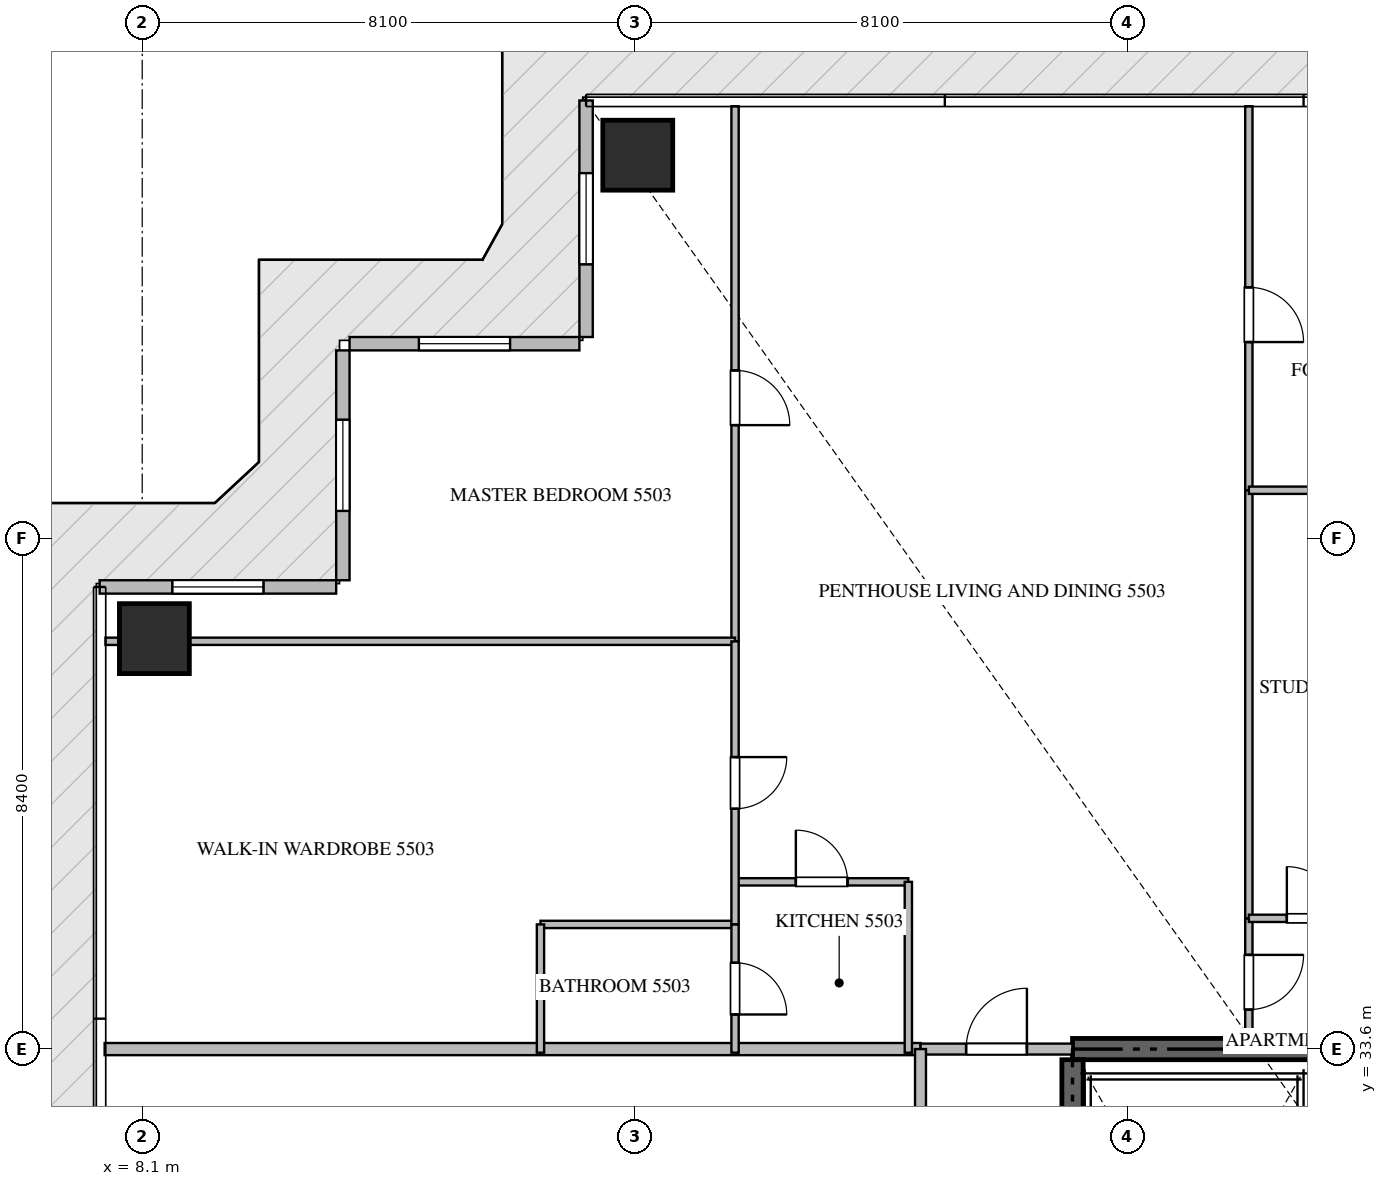
"""IFC4 building model, lengths in metres.
Left out: names, types, materials, properties, quantities, classifications, styles, units other than length and angle.
Written with IfcOpenShell. Run it as: python <this file> out.ifc"""

import sys

from ifc_helpers import new_model, si_unit, direction, frame, frame_2d, origin, origin_2d, place, context, subcontext, project, spatial, rectangle, extrude, source, transform, mapped, element, fill, save


model = new_model("IFC4")
c1 = context("Model", 3, precision=1e-05, world=origin(), true_north=direction((0.0, 1.0)))
c2 = subcontext(c1, "Body", "Model", "MODEL_VIEW")
j1 = project(units=[si_unit("LENGTHUNIT", "METRE"), si_unit("PLANEANGLEUNIT", "RADIAN")], contexts=[c1])
p1 = place(None, origin())
s1 = spatial("IfcSite", under=j1, at=p1, CompositionType="ELEMENT")
p2 = place(p1, origin())
s2 = spatial("IfcBuilding", under=s1, at=p2, CompositionType="ELEMENT")
p3 = place(p2, frame((0.0, 0.0, 222.0)))
s3 = spatial("IfcBuildingStorey", under=s2, at=p3, CompositionType="ELEMENT", Elevation=222.0)
p4 = place(p3, frame((41.4, 33.6, -0.26), z_axis=(0.0, 0.0, 1.0), x_axis=(-1.0, 0.0, 0.0)))
e1 = element("IfcWall", 1, at=p4, inside=s3, PredefinedType="SHEAR", context=c2, shape_type="SweptSolid", body=[
    extrude(rectangle(XDim=18.0, YDim=0.35, at=frame_2d((9.0, 0.0))), origin(), (0.0, 0.0, 1.0), 3.848),
])
p5 = place(p3, frame((23.4, 24.25, -0.26), z_axis=(0.0, 0.0, 1.0), x_axis=(0.0, 1.0, 0.0)))
e2 = element("IfcWall", 2, at=p5, inside=s3, PredefinedType="SHEAR", context=c2, shape_type="SweptSolid", body=[
    extrude(rectangle(XDim=9.175, YDim=0.35, at=frame_2d((4.587, 0.0))), origin(), (0.0, 0.0, 1.0), 3.848),
])
m1 = source(origin(), c2, "Body", "SweptSolid", [
    extrude(rectangle(XDim=1.15, YDim=1.15, at=origin_2d()), origin(), (0.0, 0.0, 1.0), 3.85),
])
for number, where, z_axis, x_axis in (
    (3, (16.25, 48.3, -0.26), (0.0, 0.0, 1.0), (1.0, 0.0, 0.0)),
    (4, (8.3, 40.35, -0.26), (0.0, 0.0, 1.0), (1.0, 0.0, 0.0)),
):
    element("IfcColumn", number, at=place(p3, frame(where, z_axis=z_axis, x_axis=x_axis)), inside=s3, PredefinedType="COLUMN", context=c2, shape_type="MappedRepresentation", body=[
        mapped(m1, transform((0.0, 0.0, 0.0), scale=1.0)),
    ])
p6 = place(p3, frame((15.4, 49.2, 0.0), z_axis=(0.0, 0.0, 1.0), x_axis=(0.0, -1.0, 0.0)))
e5 = element("IfcWall", 5, at=p6, inside=s3, PredefinedType="ELEMENTEDWALL", context=c2, shape_type="SweptSolid", body=[
    extrude(rectangle(XDim=3.89, YDim=0.22, at=frame_2d((1.945, 0.0))), origin(), (0.0, 0.0, 1.0), 3.575),
])
p7 = place(p6, frame((1.195, 0.0, 0.65)))
e6 = element("IfcOpeningElement", 6, at=p7, cuts=e5, PredefinedType="OPENING", context=c2, shape_type="SweptSolid", body=[
    extrude(rectangle(XDim=1.5, YDim=2.25, at=frame_2d((0.75, 1.125))), frame((0.0, 0.12, 0.0), z_axis=(0.0, -1.0, 0.0), x_axis=(1.0, 0.0, 0.0)), (0.0, 0.0, 1.0), 0.24),
])
p8 = place(p3, frame((15.29, 45.2, 0.0), z_axis=(0.0, 0.0, 1.0), x_axis=(-1.0, 0.0, 0.0)))
e7 = element("IfcWall", 7, at=p8, inside=s3, PredefinedType="ELEMENTEDWALL", context=c2, shape_type="SweptSolid", body=[
    extrude(rectangle(XDim=3.78, YDim=0.22, at=frame_2d((1.89, 0.0))), origin(), (0.0, 0.0, 1.0), 3.575),
])
p9 = place(p8, frame((1.14, 0.0, 0.65)))
e8 = element("IfcOpeningElement", 8, at=p9, cuts=e7, PredefinedType="OPENING", context=c2, shape_type="SweptSolid", body=[
    extrude(rectangle(XDim=1.5, YDim=2.25, at=frame_2d((0.75, 1.125))), frame((0.0, 0.12, 0.0), z_axis=(0.0, -1.0, 0.0), x_axis=(1.0, 0.0, 0.0)), (0.0, 0.0, 1.0), 0.24),
])
p10 = place(p3, frame((11.4, 45.09, 0.0), z_axis=(0.0, 0.0, 1.0), x_axis=(0.0, -1.0, 0.0)))
e9 = element("IfcWall", 9, at=p10, inside=s3, PredefinedType="ELEMENTEDWALL", context=c2, shape_type="SweptSolid", body=[
    extrude(rectangle(XDim=3.78, YDim=0.22, at=frame_2d((1.89, 0.0))), origin(), (0.0, 0.0, 1.0), 3.575),
])
p11 = place(p10, frame((1.14, 0.0, 0.65)))
e10 = element("IfcOpeningElement", 10, at=p11, cuts=e9, PredefinedType="OPENING", context=c2, shape_type="SweptSolid", body=[
    extrude(rectangle(XDim=1.5, YDim=2.25, at=frame_2d((0.75, 1.125))), frame((0.0, 0.12, 0.0), z_axis=(0.0, -1.0, 0.0), x_axis=(1.0, 0.0, 0.0)), (0.0, 0.0, 1.0), 0.24),
])
p12 = place(p3, frame((11.29, 41.2, 0.0), z_axis=(0.0, 0.0, 1.0), x_axis=(-1.0, 0.0, 0.0)))
e11 = element("IfcWall", 11, at=p12, inside=s3, PredefinedType="ELEMENTEDWALL", context=c2, shape_type="SweptSolid", body=[
    extrude(rectangle(XDim=3.89, YDim=0.22, at=frame_2d((1.945, 0.0))), origin(), (0.0, 0.0, 1.0), 3.575),
])
p13 = place(p12, frame((1.195, 0.0, 0.65)))
e12 = element("IfcOpeningElement", 12, at=p13, cuts=e11, PredefinedType="OPENING", context=c2, shape_type="SweptSolid", body=[
    extrude(rectangle(XDim=1.5, YDim=2.25, at=frame_2d((0.75, 1.125))), frame((0.0, 0.12, 0.0), z_axis=(0.0, -1.0, 0.0), x_axis=(1.0, 0.0, 0.0)), (0.0, 0.0, 1.0), 0.24),
])
p14 = place(p3, frame((7.482, 33.6, 0.0), z_axis=(0.0, 0.0, 1.0), x_axis=(1.0, 0.0, 0.0)))
e13 = element("IfcWall", 13, at=p14, inside=s3, PredefinedType="PARTITIONING", context=c2, shape_type="SweptSolid", body=[
    extrude(rectangle(XDim=13.418, YDim=0.2, at=frame_2d((6.709, 0.0))), origin(), (0.0, 0.0, 1.0), 3.59),
])
p15 = place(p3, frame((20.902, 33.6, 0.0), z_axis=(0.0, 0.0, 1.0), x_axis=(1.0, 0.0, 0.0)))
e14 = element("IfcWall", 14, at=p15, inside=s3, PredefinedType="PARTITIONING", context=c2, shape_type="SweptSolid", body=[
    extrude(rectangle(XDim=2.496, YDim=0.18, at=frame_2d((1.248, 0.0))), origin(), (0.0, 0.0, 1.0), 3.59),
])
p16 = place(p15, frame((0.748, 0.0, 0.0)))
e15 = element("IfcOpeningElement", 15, at=p16, cuts=e14, PredefinedType="OPENING", context=c2, shape_type="SweptSolid", body=[
    extrude(rectangle(XDim=1.0, YDim=2.15, at=frame_2d((0.5, 1.075))), frame((0.0, 0.1, 0.0), z_axis=(0.0, -1.0, 0.0), x_axis=(1.0, 0.0, 0.0)), (0.0, 0.0, 1.0), 0.2),
])
p17 = place(p3, frame((20.9, 16.8, 0.0), z_axis=(0.0, 0.0, 1.0), x_axis=(0.0, 1.0, 0.0)))
e16 = element("IfcWall", 16, at=p17, inside=s3, PredefinedType="PARTITIONING", context=c2, shape_type="SweptSolid", body=[
    extrude(rectangle(XDim=16.8, YDim=0.18, at=frame_2d((8.4, 0.0))), origin(), (0.0, 0.0, 1.0), 3.59),
])
p18 = place(p17, frame((4.503, 0.0, 0.0)))
e17 = element("IfcOpeningElement", 17, at=p18, cuts=e16, PredefinedType="OPENING", context=c2, shape_type="SweptSolid", body=[
    extrude(rectangle(XDim=1.0, YDim=2.15, at=frame_2d((0.5, 1.075))), frame((0.0, 0.1, 0.0), z_axis=(0.0, -1.0, 0.0), x_axis=(1.0, 0.0, 0.0)), (0.0, 0.0, 1.0), 0.2),
])
p19 = place(p17, frame((12.924, 0.0, 0.0)))
e18 = element("IfcOpeningElement", 18, at=p19, cuts=e16, PredefinedType="OPENING", context=c2, shape_type="SweptSolid", body=[
    extrude(rectangle(XDim=1.0, YDim=2.15, at=frame_2d((0.5, 1.075))), frame((0.0, 0.1, 0.0), z_axis=(0.0, -1.0, 0.0), x_axis=(1.0, 0.0, 0.0)), (0.0, 0.0, 1.0), 0.2),
])
p20 = place(p3, frame((17.85, 36.35, 0.0), z_axis=(0.0, 0.0, 1.0), x_axis=(1.0, 0.0, 0.0)))
e19 = element("IfcWall", 19, at=p20, inside=s3, PredefinedType="PARTITIONING", context=c2, shape_type="SweptSolid", body=[
    extrude(rectangle(XDim=2.85, YDim=0.12, at=frame_2d((1.425, 0.0))), origin(), (0.0, 0.0, 1.0), 3.59),
])
p21 = place(p20, frame((1.0, 0.0, 0.0)))
e20 = element("IfcOpeningElement", 20, at=p21, cuts=e19, PredefinedType="OPENING", context=c2, shape_type="SweptSolid", body=[
    extrude(rectangle(XDim=0.85, YDim=2.1, at=frame_2d((0.425, 1.05))), frame((0.0, 0.07, 0.0), z_axis=(0.0, -1.0, 0.0), x_axis=(1.0, 0.0, 0.0)), (0.0, 0.0, 1.0), 0.14),
])
p22 = place(p3, frame((20.7, 36.35, 0.0), z_axis=(0.0, 0.0, 1.0), x_axis=(0.0, -1.0, 0.0)))
e21 = element("IfcWall", 21, at=p22, inside=s3, PredefinedType="PARTITIONING", context=c2, shape_type="SweptSolid", body=[
    extrude(rectangle(XDim=2.81, YDim=0.12, at=frame_2d((1.405, 0.0))), origin(), (0.0, 0.0, 1.0), 3.59),
])
p23 = place(p3, frame((17.85, 49.105, 0.0), z_axis=(0.0, 0.0, 1.0), x_axis=(0.0, -1.0, 0.0)))
e22 = element("IfcWall", 22, at=p23, inside=s3, PredefinedType="PARTITIONING", context=c2, shape_type="SweptSolid", body=[
    extrude(rectangle(XDim=8.799, YDim=0.12, at=frame_2d((4.399, 0.0))), origin(), (0.0, 0.0, 1.0), 3.59),
])
p24 = place(p23, frame((4.344, 0.0, 0.0)))
e23 = element("IfcOpeningElement", 23, at=p24, cuts=e22, PredefinedType="OPENING", context=c2, shape_type="SweptSolid", body=[
    extrude(rectangle(XDim=0.9, YDim=2.1, at=frame_2d((0.45, 1.05))), frame((0.0, 0.07, 0.0), z_axis=(0.0, -1.0, 0.0), x_axis=(1.0, 0.0, 0.0)), (0.0, 0.0, 1.0), 0.14),
])
p25 = place(p3, frame((7.495, 40.306, 0.0), z_axis=(0.0, 0.0, 1.0), x_axis=(1.0, 0.0, 0.0)))
e24 = element("IfcWall", 24, at=p25, inside=s3, PredefinedType="PARTITIONING", context=c2, shape_type="SweptSolid", body=[
    extrude(rectangle(XDim=10.355, YDim=0.12, at=frame_2d((5.177, 0.0))), origin(), (0.0, 0.0, 1.0), 3.122),
])
p26 = place(p3, frame((14.65, 35.65, 0.0), z_axis=(0.0, 0.0, 1.0), x_axis=(1.0, 0.0, 0.0)))
e25 = element("IfcWall", 25, at=p26, inside=s3, PredefinedType="PARTITIONING", context=c2, shape_type="SweptSolid", body=[
    extrude(rectangle(XDim=3.2, YDim=0.12, at=frame_2d((1.6, 0.0))), origin(), (0.0, 0.0, 1.0), 3.59),
])
p27 = place(p3, frame((14.65, 35.65, 0.0), z_axis=(0.0, 0.0, 1.0), x_axis=(0.0, -1.0, 0.0)))
e26 = element("IfcWall", 26, at=p27, inside=s3, PredefinedType="PARTITIONING", context=c2, shape_type="SweptSolid", body=[
    extrude(rectangle(XDim=2.11, YDim=0.12, at=frame_2d((1.055, 0.0))), origin(), (0.0, 0.0, 1.0), 3.59),
])
p28 = place(p3, frame((17.85, 40.304, 0.0), z_axis=(0.0, 0.0, 1.0), x_axis=(0.0, -1.0, 0.0)))
e27 = element("IfcWall", 27, at=p28, inside=s3, PredefinedType="PARTITIONING", context=c2, shape_type="SweptSolid", body=[
    extrude(rectangle(XDim=4.654, YDim=0.12, at=frame_2d((2.327, 0.0))), origin(), (0.0, 0.0, 1.0), 3.59),
])
p29 = place(p28, frame((1.902, 0.0, 0.0)))
e28 = element("IfcOpeningElement", 28, at=p29, cuts=e27, PredefinedType="OPENING", context=c2, shape_type="SweptSolid", body=[
    extrude(rectangle(XDim=0.85, YDim=2.1, at=frame_2d((0.425, 1.05))), frame((0.0, 0.07, 0.0), z_axis=(0.0, -1.0, 0.0), x_axis=(1.0, 0.0, 0.0)), (0.0, 0.0, 1.0), 0.14),
])
p30 = place(p3, frame((17.85, 35.648, 0.0), z_axis=(0.0, 0.0, 1.0), x_axis=(0.0, -1.0, 0.0)))
e29 = element("IfcWall", 29, at=p30, inside=s3, PredefinedType="PARTITIONING", context=c2, shape_type="SweptSolid", body=[
    extrude(rectangle(XDim=2.108, YDim=0.12, at=frame_2d((1.054, 0.0))), origin(), (0.0, 0.0, 1.0), 3.59),
])
p31 = place(p30, frame((0.629, 0.0, 0.0)))
e30 = element("IfcOpeningElement", 30, at=p31, cuts=e29, PredefinedType="OPENING", context=c2, shape_type="SweptSolid", body=[
    extrude(rectangle(XDim=0.85, YDim=2.1, at=frame_2d((0.425, 1.05))), frame((0.0, 0.07, 0.0), z_axis=(0.0, -1.0, 0.0), x_axis=(1.0, 0.0, 0.0)), (0.0, 0.0, 1.0), 0.14),
])
p32 = place(p3, frame((26.3, 35.75, 0.0), z_axis=(0.0, 0.0, 1.0), x_axis=(0.0, -1.0, 0.0)))
e31 = element("IfcWall", 31, at=p32, inside=s3, PredefinedType="PARTITIONING", context=c2, shape_type="SweptSolid", body=[
    extrude(rectangle(XDim=1.975, YDim=0.12, at=frame_2d((0.988, 0.0))), origin(), (0.0, 0.0, 1.0), 3.59),
])
p33 = place(p32, frame((0.601, 0.0, 0.0)))
e32 = element("IfcOpeningElement", 32, at=p33, cuts=e31, PredefinedType="OPENING", context=c2, shape_type="SweptSolid", body=[
    extrude(rectangle(XDim=0.9, YDim=2.1, at=frame_2d((0.45, 1.05))), frame((0.0, 0.07, 0.0), z_axis=(0.0, -1.0, 0.0), x_axis=(1.0, 0.0, 0.0)), (0.0, 0.0, 1.0), 0.14),
])
p34 = place(p3, frame((26.3, 49.105, 0.0), z_axis=(0.0, 0.0, 1.0), x_axis=(0.0, -1.0, 0.0)))
e33 = element("IfcWall", 33, at=p34, inside=s3, PredefinedType="PARTITIONING", context=c2, shape_type="SweptSolid", body=[
    extrude(rectangle(XDim=6.315, YDim=0.12, at=frame_2d((3.157, 0.0))), origin(), (0.0, 0.0, 1.0), 3.59),
])
p35 = place(p34, frame((2.978, 0.0, 0.0)))
e34 = element("IfcOpeningElement", 34, at=p35, cuts=e33, PredefinedType="OPENING", context=c2, shape_type="SweptSolid", body=[
    extrude(rectangle(XDim=0.9, YDim=2.1, at=frame_2d((0.45, 1.05))), frame((0.0, 0.07, 0.0), z_axis=(0.0, -1.0, 0.0), x_axis=(1.0, 0.0, 0.0)), (0.0, 0.0, 1.0), 0.14),
])
p36 = place(p3, frame((26.3, 42.788, 0.0), z_axis=(0.0, 0.0, 1.0), x_axis=(0.0, -1.0, 0.0)))
e35 = element("IfcWall", 35, at=p36, inside=s3, PredefinedType="PARTITIONING", context=c2, shape_type="SweptSolid", body=[
    extrude(rectangle(XDim=7.036, YDim=0.12, at=frame_2d((3.518, 0.0))), origin(), (0.0, 0.0, 1.0), 3.59),
])
p37 = place(p3, frame((26.3, 42.79, 0.0), z_axis=(0.0, 0.0, 1.0), x_axis=(1.0, 0.0, 0.0)))
e36 = element("IfcWall", 36, at=p37, inside=s3, PredefinedType="PARTITIONING", context=c2, shape_type="SweptSolid", body=[
    extrude(rectangle(XDim=5.12, YDim=0.12, at=frame_2d((2.56, 0.0))), origin(), (0.0, 0.0, 1.0), 3.59),
])
p38 = place(p3, frame((26.3, 35.75, 0.0), z_axis=(0.0, 0.0, 1.0), x_axis=(1.0, 0.0, 0.0)))
e37 = element("IfcWall", 37, at=p38, inside=s3, PredefinedType="PARTITIONING", context=c2, shape_type="SweptSolid", body=[
    extrude(rectangle(XDim=2.1, YDim=0.12, at=frame_2d((1.05, 0.0))), origin(), (0.0, 0.0, 1.0), 3.59),
])
p39 = place(p38, frame((0.625, 0.0, 0.0)))
e38 = element("IfcOpeningElement", 38, at=p39, cuts=e37, PredefinedType="OPENING", context=c2, shape_type="SweptSolid", body=[
    extrude(rectangle(XDim=0.85, YDim=2.1, at=frame_2d((0.425, 1.05))), frame((0.0, 0.07, 0.0), z_axis=(0.0, -1.0, 0.0), x_axis=(1.0, 0.0, 0.0)), (0.0, 0.0, 1.0), 0.14),
])
m2 = source(origin(), c2, "Body", "SweptSolid", [
    extrude(rectangle(XDim=1.5, YDim=2.25, at=frame_2d((0.75, 1.125))), frame((0.0, 0.03, 0.0), z_axis=(0.0, -1.0, 0.0), x_axis=(1.0, 0.0, 0.0)), (0.0, 0.0, 1.0), 0.06),
])
p40 = place(p7, origin())
e39 = element("IfcWindow", 39, at=p40, inside=s3, PartitioningType="SINGLE_PANEL", PredefinedType="WINDOW", context=c2, shape_type="MappedRepresentation", body=[
    mapped(m2, transform((0.0, 0.0, 0.0), scale=1.0)),
])
fill(e6, e39)
p41 = place(p9, origin())
e40 = element("IfcWindow", 40, at=p41, inside=s3, PartitioningType="SINGLE_PANEL", PredefinedType="WINDOW", context=c2, shape_type="MappedRepresentation", body=[
    mapped(m2, transform((0.0, 0.0, 0.0), scale=1.0)),
])
fill(e8, e40)
p42 = place(p11, origin())
e41 = element("IfcWindow", 41, at=p42, inside=s3, PartitioningType="SINGLE_PANEL", PredefinedType="WINDOW", context=c2, shape_type="MappedRepresentation", body=[
    mapped(m2, transform((0.0, 0.0, 0.0), scale=1.0)),
])
fill(e10, e41)
p43 = place(p13, origin())
e42 = element("IfcWindow", 42, at=p43, inside=s3, PartitioningType="SINGLE_PANEL", PredefinedType="WINDOW", context=c2, shape_type="MappedRepresentation", body=[
    mapped(m2, transform((0.0, 0.0, 0.0), scale=1.0)),
])
fill(e12, e42)
m3 = source(origin(), c2, "Body", "SweptSolid", [
    extrude(rectangle(XDim=1.0, YDim=2.15, at=frame_2d((0.5, 1.075))), frame((0.0, 0.025, 0.0), z_axis=(0.0, -1.0, 0.0), x_axis=(1.0, 0.0, 0.0)), (0.0, 0.0, 1.0), 0.05),
])
p44 = place(p16, origin())
e43 = element("IfcDoor", 43, at=p44, inside=s3, OperationType="SINGLE_SWING_RIGHT", PredefinedType="DOOR", context=c2, shape_type="MappedRepresentation", body=[
    mapped(m3, transform((0.0, 0.0, 0.0), scale=1.0)),
])
fill(e15, e43)
m4 = source(origin(), c2, "Body", "SweptSolid", [
    extrude(rectangle(XDim=0.85, YDim=2.1, at=frame_2d((0.425, 1.05))), frame((0.0, 0.025, 0.0), z_axis=(0.0, -1.0, 0.0), x_axis=(1.0, 0.0, 0.0)), (0.0, 0.0, 1.0), 0.05),
])
p45 = place(p21, origin())
e44 = element("IfcDoor", 44, at=p45, inside=s3, OperationType="SINGLE_SWING_LEFT", PredefinedType="DOOR", context=c2, shape_type="MappedRepresentation", body=[
    mapped(m4, transform((0.0, 0.0, 0.0), scale=1.0)),
])
fill(e20, e44)
m5 = source(origin(), c2, "Body", "SweptSolid", [
    extrude(rectangle(XDim=0.9, YDim=2.1, at=frame_2d((0.45, 1.05))), frame((0.0, 0.025, 0.0), z_axis=(0.0, -1.0, 0.0), x_axis=(1.0, 0.0, 0.0)), (0.0, 0.0, 1.0), 0.05),
])
p46 = place(p24, origin())
e45 = element("IfcDoor", 45, at=p46, inside=s3, OperationType="SINGLE_SWING_RIGHT", PredefinedType="DOOR", context=c2, shape_type="MappedRepresentation", body=[
    mapped(m5, transform((0.0, 0.0, 0.0), scale=1.0)),
])
fill(e23, e45)
p47 = place(p29, origin())
e46 = element("IfcDoor", 46, at=p47, inside=s3, OperationType="SINGLE_SWING_LEFT", PredefinedType="DOOR", context=c2, shape_type="MappedRepresentation", body=[
    mapped(m4, transform((0.0, 0.0, 0.0), scale=1.0)),
])
fill(e28, e46)
p48 = place(p31, origin())
e47 = element("IfcDoor", 47, at=p48, inside=s3, OperationType="SINGLE_SWING_RIGHT", PredefinedType="DOOR", context=c2, shape_type="MappedRepresentation", body=[
    mapped(m4, transform((0.0, 0.0, 0.0), scale=1.0)),
])
fill(e30, e47)
p49 = place(p33, origin())
e48 = element("IfcDoor", 48, at=p49, inside=s3, OperationType="SINGLE_SWING_LEFT", PredefinedType="DOOR", context=c2, shape_type="MappedRepresentation", body=[
    mapped(m5, transform((0.0, 0.0, 0.0), scale=1.0)),
])
fill(e32, e48)
p50 = place(p35, origin())
e49 = element("IfcDoor", 49, at=p50, inside=s3, OperationType="SINGLE_SWING_RIGHT", PredefinedType="DOOR", context=c2, shape_type="MappedRepresentation", body=[
    mapped(m5, transform((0.0, 0.0, 0.0), scale=1.0)),
])
fill(e34, e49)
p51 = place(p39, origin())
e50 = element("IfcDoor", 50, at=p51, inside=s3, OperationType="SINGLE_SWING_LEFT", PredefinedType="DOOR", context=c2, shape_type="MappedRepresentation", body=[
    mapped(m4, transform((0.0, 0.0, 0.0), scale=1.0)),
])
fill(e38, e50)
save(model, sys.argv[1])
